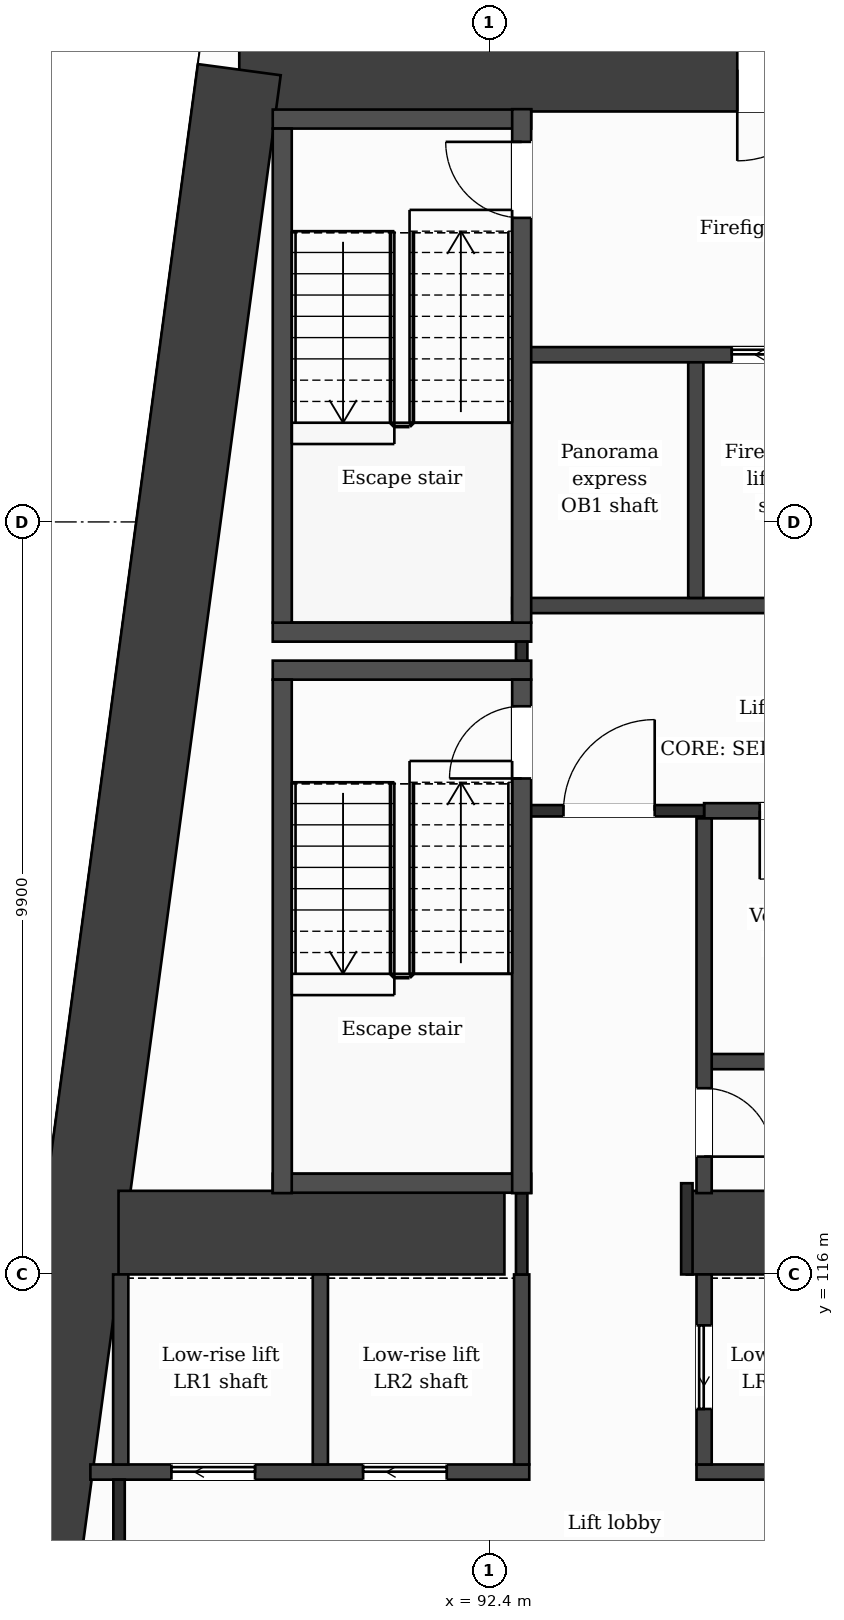
"""IFC4 building model, lengths in metres.
Left out: names, types, materials, properties, quantities, classifications, styles, units other than length and angle.
Written with IfcOpenShell. Run it as: python <this file> out.ifc"""

import sys

from ifc_helpers import new_model, si_unit, direction, frame, frame_2d, origin, place, context, subcontext, project, spatial, rectangle, extrude, element, fill, save


model = new_model("IFC4")
c1 = context("Model", 3, precision=1e-05, world=origin(), true_north=direction((0.0, 1.0)))
c2 = subcontext(c1, "Body", "Model", "MODEL_VIEW")
j1 = project(units=[si_unit("LENGTHUNIT", "METRE"), si_unit("PLANEANGLEUNIT", "RADIAN")], contexts=[c1])
p1 = place(None, origin())
s1 = spatial("IfcSite", under=j1, at=p1, CompositionType="ELEMENT")
p2 = place(p1, origin())
s2 = spatial("IfcBuilding", under=s1, at=p2, CompositionType="ELEMENT")
p3 = place(p2, frame((0.0, 0.0, 56.5)))
s3 = spatial("IfcBuildingStorey", under=s2, at=p3, CompositionType="ELEMENT", Elevation=56.5)
p4 = place(p3, frame((89.112, 131.85, 0.0), z_axis=(0.0, 0.0, 1.0), x_axis=(1.0, 0.0, 0.0)))
e1 = element("IfcWall", 1, at=p4, inside=s3, PredefinedType="SHEAR", context=c2, shape_type="SweptSolid", body=[
    extrude(rectangle(XDim=11.138, YDim=1.1, at=frame_2d((5.569, 0.0))), origin(), (0.0, 0.0, 1.0), 3.5),
])
p5 = place(p4, frame((6.552, 0.0, 0.0)))
e2 = element("IfcOpeningElement", 2, at=p5, cuts=e1, PredefinedType="OPENING", context=c2, shape_type="SweptSolid", body=[
    extrude(rectangle(XDim=1.2, YDim=2.1, at=frame_2d((0.6, 1.05))), frame((0.0, 0.56, 0.0), z_axis=(0.0, -1.0, 0.0), x_axis=(1.0, 0.0, 0.0)), (0.0, 0.0, 1.0), 1.12),
])
p6 = place(p3, frame((86.298, 110.95, 0.0), z_axis=(0.0, 0.0, 1.0), x_axis=(0.133400422634, 0.99106222168, 0.0)))
e3 = element("IfcWall", 3, at=p6, inside=s3, PredefinedType="SHEAR", context=c2, shape_type="SweptSolid", body=[
    extrude(rectangle(XDim=21.089, YDim=1.1, at=frame_2d((10.544, 0.0))), origin(), (0.0, 0.0, 1.0), 3.5),
])
p7 = place(p3, frame((87.523, 116.55, 0.0), z_axis=(0.0, 0.0, 1.0), x_axis=(1.0, 0.0, 0.0)))
e4 = element("IfcWall", 4, at=p7, inside=s3, PredefinedType="SHEAR", context=c2, shape_type="SweptSolid", body=[
    extrude(rectangle(XDim=5.077, YDim=1.1, at=frame_2d((2.539, 0.0))), origin(), (0.0, 0.0, 1.0), 3.5),
])
p8 = place(p3, frame((95.0, 116.55, 0.0), z_axis=(0.0, 0.0, 1.0), x_axis=(1.0, 0.0, 0.0)))
e5 = element("IfcWall", 5, at=p8, inside=s3, PredefinedType="SHEAR", context=c2, shape_type="SweptSolid", body=[
    extrude(rectangle(XDim=4.7, YDim=1.1, at=frame_2d((2.35, 0.0))), origin(), (0.0, 0.0, 1.0), 3.5),
])
p9 = place(p3, frame((87.153, 113.4, 0.0), z_axis=(0.0, 0.0, 1.0), x_axis=(1.0, 0.0, 0.0)))
e6 = element("IfcWall", 6, at=p9, inside=s3, PredefinedType="PARTITIONING", context=c2, shape_type="SweptSolid", body=[
    extrude(rectangle(XDim=5.774, YDim=0.2, at=frame_2d((2.887, 0.0))), origin(), (0.0, 0.0, 1.0), 3.18),
])
p10 = place(p9, frame((1.066, 0.0, 0.0)))
e7 = element("IfcOpeningElement", 7, at=p10, cuts=e6, PredefinedType="OPENING", context=c2, shape_type="SweptSolid", body=[
    extrude(rectangle(XDim=1.1, YDim=2.1, at=frame_2d((0.55, 1.05))), frame((0.0, 0.11, 0.0), z_axis=(0.0, -1.0, 0.0), x_axis=(1.0, 0.0, 0.0)), (0.0, 0.0, 1.0), 0.22),
])
p11 = place(p9, frame((3.588, 0.0, 0.0)))
e8 = element("IfcOpeningElement", 8, at=p11, cuts=e6, PredefinedType="OPENING", context=c2, shape_type="SweptSolid", body=[
    extrude(rectangle(XDim=1.1, YDim=2.1, at=frame_2d((0.55, 1.05))), frame((0.0, 0.11, 0.0), z_axis=(0.0, -1.0, 0.0), x_axis=(1.0, 0.0, 0.0)), (0.0, 0.0, 1.0), 0.22),
])
p12 = place(p3, frame((95.127, 113.4, 0.0), z_axis=(0.0, 0.0, 1.0), x_axis=(1.0, 0.0, 0.0)))
e9 = element("IfcWall", 9, at=p12, inside=s3, PredefinedType="PARTITIONING", context=c2, shape_type="SweptSolid", body=[
    extrude(rectangle(XDim=4.573, YDim=0.2, at=frame_2d((2.287, 0.0))), origin(), (0.0, 0.0, 1.0), 3.18),
])
p13 = place(p12, frame((3.164, 0.0, 0.0)))
e10 = element("IfcOpeningElement", 10, at=p13, cuts=e9, PredefinedType="OPENING", context=c2, shape_type="SweptSolid", body=[
    extrude(rectangle(XDim=0.9, YDim=2.1, at=frame_2d((0.45, 1.05))), frame((0.0, 0.11, 0.0), z_axis=(0.0, -1.0, 0.0), x_axis=(1.0, 0.0, 0.0)), (0.0, 0.0, 1.0), 0.22),
])
p14 = place(p3, frame((89.552, 117.2, 0.0), z_axis=(0.0, 0.0, 1.0), x_axis=(1.0, 0.0, 0.0)))
e11 = element("IfcWall", 11, at=p14, inside=s3, PredefinedType="PARTITIONING", context=c2, shape_type="SweptSolid", body=[
    extrude(rectangle(XDim=3.4, YDim=0.25, at=frame_2d((1.7, 0.0))), origin(), (0.0, 0.0, 1.0), 3.18),
])
p15 = place(p3, frame((95.227, 118.8, 0.0), z_axis=(0.0, 0.0, 1.0), x_axis=(1.0, 0.0, 0.0)))
e12 = element("IfcWall", 12, at=p15, inside=s3, PredefinedType="PARTITIONING", context=c2, shape_type="SweptSolid", body=[
    extrude(rectangle(XDim=4.473, YDim=0.2, at=frame_2d((2.236, 0.0))), origin(), (0.0, 0.0, 1.0), 3.18),
])
p16 = place(p3, frame((95.227, 122.1, 0.0), z_axis=(0.0, 0.0, 1.0), x_axis=(1.0, 0.0, 0.0)))
e13 = element("IfcWall", 13, at=p16, inside=s3, PredefinedType="PARTITIONING", context=c2, shape_type="SweptSolid", body=[
    extrude(rectangle(XDim=4.473, YDim=0.2, at=frame_2d((2.236, 0.0))), origin(), (0.0, 0.0, 1.0), 3.18),
])
p17 = place(p16, frame((0.732, 0.0, 0.0)))
e14 = element("IfcOpeningElement", 14, at=p17, cuts=e13, PredefinedType="OPENING", context=c2, shape_type="SweptSolid", body=[
    extrude(rectangle(XDim=0.9, YDim=2.1, at=frame_2d((0.45, 1.05))), frame((0.0, 0.11, 0.0), z_axis=(0.0, -1.0, 0.0), x_axis=(1.0, 0.0, 0.0)), (0.0, 0.0, 1.0), 0.22),
])
p18 = place(p16, frame((3.064, 0.0, 0.0)))
e15 = element("IfcOpeningElement", 15, at=p18, cuts=e13, PredefinedType="OPENING", context=c2, shape_type="SweptSolid", body=[
    extrude(rectangle(XDim=0.9, YDim=2.1, at=frame_2d((0.45, 1.05))), frame((0.0, 0.11, 0.0), z_axis=(0.0, -1.0, 0.0), x_axis=(1.0, 0.0, 0.0)), (0.0, 0.0, 1.0), 0.22),
])
p19 = place(p3, frame((92.827, 122.1, 0.0), z_axis=(0.0, 0.0, 1.0), x_axis=(1.0, 0.0, 0.0)))
e16 = element("IfcWall", 16, at=p19, inside=s3, PredefinedType="PARTITIONING", context=c2, shape_type="SweptSolid", body=[
    extrude(rectangle(XDim=2.4, YDim=0.15, at=frame_2d((1.2, 0.0))), origin(), (0.0, 0.0, 1.0), 3.18),
])
p20 = place(p19, frame((0.55, 0.0, 0.0)))
e17 = element("IfcOpeningElement", 17, at=p20, cuts=e16, PredefinedType="OPENING", context=c2, shape_type="SweptSolid", body=[
    extrude(rectangle(XDim=1.2, YDim=2.1, at=frame_2d((0.6, 1.05))), frame((0.0, 0.085, 0.0), z_axis=(0.0, -1.0, 0.0), x_axis=(1.0, 0.0, 0.0)), (0.0, 0.0, 1.0), 0.17),
])
for number, where, z_axis, x_axis in (
    (18, (89.552, 123.95, 0.0), (0.0, 0.0, 1.0), (1.0, 0.0, 0.0)),
    (19, (89.552, 124.45, 0.0), (0.0, 0.0, 1.0), (1.0, 0.0, 0.0)),
):
    element("IfcWall", number, at=place(p3, frame(where, z_axis=z_axis, x_axis=x_axis)), inside=s3, PredefinedType="PARTITIONING", context=c2, shape_type="SweptSolid", body=[
        extrude(rectangle(XDim=3.4, YDim=0.25, at=frame_2d((1.7, 0.0))), origin(), (0.0, 0.0, 1.0), 3.18),
    ])
p21 = place(p3, frame((92.702, 124.8, 0.0), z_axis=(0.0, 0.0, 1.0), x_axis=(1.0, 0.0, 0.0)))
e20 = element("IfcWall", 20, at=p21, inside=s3, PredefinedType="PARTITIONING", context=c2, shape_type="SweptSolid", body=[
    extrude(rectangle(XDim=6.998, YDim=0.2, at=frame_2d((3.499, 0.0))), origin(), (0.0, 0.0, 1.0), 3.18),
])
p22 = place(p21, frame((5.253, 0.0, 0.0)))
e21 = element("IfcOpeningElement", 21, at=p22, cuts=e20, PredefinedType="OPENING", context=c2, shape_type="SweptSolid", body=[
    extrude(rectangle(XDim=1.1, YDim=2.1, at=frame_2d((0.55, 1.05))), frame((0.0, 0.11, 0.0), z_axis=(0.0, -1.0, 0.0), x_axis=(1.0, 0.0, 0.0)), (0.0, 0.0, 1.0), 0.22),
])
p23 = place(p3, frame((92.827, 128.1, 0.0), z_axis=(0.0, 0.0, 1.0), x_axis=(1.0, 0.0, 0.0)))
e22 = element("IfcWall", 22, at=p23, inside=s3, PredefinedType="PARTITIONING", context=c2, shape_type="SweptSolid", body=[
    extrude(rectangle(XDim=6.873, YDim=0.2, at=frame_2d((3.437, 0.0))), origin(), (0.0, 0.0, 1.0), 3.18),
])
p24 = place(p23, frame((2.764, 0.0, 0.0)))
e23 = element("IfcOpeningElement", 23, at=p24, cuts=e22, PredefinedType="OPENING", context=c2, shape_type="SweptSolid", body=[
    extrude(rectangle(XDim=1.1, YDim=2.1, at=frame_2d((0.55, 1.05))), frame((0.0, 0.11, 0.0), z_axis=(0.0, -1.0, 0.0), x_axis=(1.0, 0.0, 0.0)), (0.0, 0.0, 1.0), 0.22),
])
p25 = place(p3, frame((89.552, 131.2, 0.0), z_axis=(0.0, 0.0, 1.0), x_axis=(1.0, 0.0, 0.0)))
e24 = element("IfcWall", 24, at=p25, inside=s3, PredefinedType="PARTITIONING", context=c2, shape_type="SweptSolid", body=[
    extrude(rectangle(XDim=3.4, YDim=0.25, at=frame_2d((1.7, 0.0))), origin(), (0.0, 0.0, 1.0), 3.18),
])
p26 = place(p3, frame((87.552, 113.5, 0.0), z_axis=(0.0, 0.0, 1.0), x_axis=(0.0, 1.0, 0.0)))
e25 = element("IfcWall", 25, at=p26, inside=s3, PredefinedType="PARTITIONING", context=c2, shape_type="SweptSolid", body=[
    extrude(rectangle(XDim=2.5, YDim=0.2, at=frame_2d((1.25, 0.0))), origin(), (0.0, 0.0, 1.0), 3.18),
])
p27 = place(p3, frame((87.53, 111.5, 0.0), z_axis=(0.0, 0.0, 1.0), x_axis=(0.0, 1.0, 0.0)))
e26 = element("IfcWall", 26, at=p27, inside=s3, PredefinedType="PARTITIONING", context=c2, shape_type="SweptSolid", body=[
    extrude(rectangle(XDim=1.8, YDim=0.15, at=frame_2d((0.9, 0.0))), origin(), (0.0, 0.0, 1.0), 3.18),
])
p28 = place(p3, frame((89.677, 117.07, 0.0), z_axis=(0.0, 0.0, 1.0), x_axis=(0.0, 1.0, 0.0)))
e27 = element("IfcWall", 27, at=p28, inside=s3, PredefinedType="PARTITIONING", context=c2, shape_type="SweptSolid", body=[
    extrude(rectangle(XDim=6.755, YDim=0.25, at=frame_2d((3.377, 0.0))), origin(), (0.0, 0.0, 1.0), 3.18),
])
p29 = place(p3, frame((89.677, 124.575, 0.0), z_axis=(0.0, 0.0, 1.0), x_axis=(0.0, 1.0, 0.0)))
e28 = element("IfcWall", 28, at=p29, inside=s3, PredefinedType="PARTITIONING", context=c2, shape_type="SweptSolid", body=[
    extrude(rectangle(XDim=6.5, YDim=0.25, at=frame_2d((3.25, 0.0))), origin(), (0.0, 0.0, 1.0), 3.18),
])
for number, where, z_axis, x_axis in (
    (29, (90.178, 113.5, 0.0), (0.0, 0.0, 1.0), (0.0, 1.0, 0.0)),
    (30, (92.827, 113.5, 0.0), (0.0, 0.0, 1.0), (0.0, 1.0, 0.0)),
):
    element("IfcWall", number, at=place(p3, frame(where, z_axis=z_axis, x_axis=x_axis)), inside=s3, PredefinedType="PARTITIONING", context=c2, shape_type="SweptSolid", body=[
        extrude(rectangle(XDim=2.5, YDim=0.2, at=frame_2d((1.25, 0.0))), origin(), (0.0, 0.0, 1.0), 3.18),
    ])
p30 = place(p3, frame((92.827, 116.0, 0.0), z_axis=(0.0, 0.0, 1.0), x_axis=(0.0, 1.0, 0.0)))
e31 = element("IfcWall", 31, at=p30, inside=s3, PredefinedType="PARTITIONING", context=c2, shape_type="SweptSolid", body=[
    extrude(rectangle(XDim=1.07, YDim=0.15, at=frame_2d((0.535, 0.0))), origin(), (0.0, 0.0, 1.0), 3.18),
])
p31 = place(p3, frame((92.827, 124.075, 0.0), z_axis=(0.0, 0.0, 1.0), x_axis=(0.0, 1.0, 0.0)))
e32 = element("IfcWall", 32, at=p31, inside=s3, PredefinedType="PARTITIONING", context=c2, shape_type="SweptSolid", body=[
    extrude(rectangle(XDim=0.25, YDim=0.15, at=frame_2d((0.125, 0.0))), origin(), (0.0, 0.0, 1.0), 3.18),
])
p32 = place(p3, frame((92.827, 117.07, 0.0), z_axis=(0.0, 0.0, 1.0), x_axis=(0.0, 1.0, 0.0)))
e33 = element("IfcWall", 33, at=p32, inside=s3, PredefinedType="PARTITIONING", context=c2, shape_type="SweptSolid", body=[
    extrude(rectangle(XDim=6.755, YDim=0.25, at=frame_2d((3.377, 0.0))), origin(), (0.0, 0.0, 1.0), 3.18),
])
p33 = place(p32, frame((5.455, 0.0, 0.0)))
e34 = element("IfcOpeningElement", 34, at=p33, cuts=e33, PredefinedType="OPENING", context=c2, shape_type="SweptSolid", body=[
    extrude(rectangle(XDim=0.95, YDim=2.1, at=frame_2d((0.475, 1.05))), frame((0.0, 0.135, 0.0), z_axis=(0.0, -1.0, 0.0), x_axis=(1.0, 0.0, 0.0)), (0.0, 0.0, 1.0), 0.27),
])
p34 = place(p3, frame((92.827, 124.575, 0.0), z_axis=(0.0, 0.0, 1.0), x_axis=(0.0, 1.0, 0.0)))
e35 = element("IfcWall", 35, at=p34, inside=s3, PredefinedType="PARTITIONING", context=c2, shape_type="SweptSolid", body=[
    extrude(rectangle(XDim=6.755, YDim=0.25, at=frame_2d((3.377, 0.0))), origin(), (0.0, 0.0, 1.0), 3.18),
])
p35 = place(p34, frame((5.325, 0.0, 0.0)))
e36 = element("IfcOpeningElement", 36, at=p35, cuts=e35, PredefinedType="OPENING", context=c2, shape_type="SweptSolid", body=[
    extrude(rectangle(XDim=1.0, YDim=2.1, at=frame_2d((0.5, 1.05))), frame((0.0, 0.135, 0.0), z_axis=(0.0, -1.0, 0.0), x_axis=(1.0, 0.0, 0.0)), (0.0, 0.0, 1.0), 0.27),
])
p36 = place(p3, frame((95.0, 116.0, 0.0), z_axis=(0.0, 0.0, 1.0), x_axis=(0.0, 1.0, 0.0)))
e37 = element("IfcWall", 37, at=p36, inside=s3, PredefinedType="PARTITIONING", context=c2, shape_type="SweptSolid", body=[
    extrude(rectangle(XDim=1.2, YDim=0.15, at=frame_2d((0.6, 0.0))), origin(), (0.0, 0.0, 1.0), 3.18),
])
p37 = place(p3, frame((95.118, 124.9, 0.0), z_axis=(0.0, 0.0, 1.0), x_axis=(0.0, 1.0, 0.0)))
e38 = element("IfcWall", 38, at=p37, inside=s3, PredefinedType="PARTITIONING", context=c2, shape_type="SweptSolid", body=[
    extrude(rectangle(XDim=3.1, YDim=0.2, at=frame_2d((1.55, 0.0))), origin(), (0.0, 0.0, 1.0), 3.18),
])
p38 = place(p3, frame((95.227, 113.5, 0.0), z_axis=(0.0, 0.0, 1.0), x_axis=(0.0, 1.0, 0.0)))
e39 = element("IfcWall", 39, at=p38, inside=s3, PredefinedType="PARTITIONING", context=c2, shape_type="SweptSolid", body=[
    extrude(rectangle(XDim=2.5, YDim=0.2, at=frame_2d((1.25, 0.0))), origin(), (0.0, 0.0, 1.0), 3.18),
])
p39 = place(p38, frame((0.73, 0.0, 0.0)))
e40 = element("IfcOpeningElement", 40, at=p39, cuts=e39, PredefinedType="OPENING", context=c2, shape_type="SweptSolid", body=[
    extrude(rectangle(XDim=1.1, YDim=2.1, at=frame_2d((0.55, 1.05))), frame((0.0, 0.11, 0.0), z_axis=(0.0, -1.0, 0.0), x_axis=(1.0, 0.0, 0.0)), (0.0, 0.0, 1.0), 0.22),
])
p40 = place(p3, frame((95.227, 117.07, 0.0), z_axis=(0.0, 0.0, 1.0), x_axis=(0.0, 1.0, 0.0)))
e41 = element("IfcWall", 41, at=p40, inside=s3, PredefinedType="PARTITIONING", context=c2, shape_type="SweptSolid", body=[
    extrude(rectangle(XDim=4.93, YDim=0.2, at=frame_2d((2.465, 0.0))), origin(), (0.0, 0.0, 1.0), 3.18),
])
p41 = place(p40, frame((0.48, 0.0, 0.0)))
e42 = element("IfcOpeningElement", 42, at=p41, cuts=e41, PredefinedType="OPENING", context=c2, shape_type="SweptSolid", body=[
    extrude(rectangle(XDim=0.9, YDim=2.1, at=frame_2d((0.45, 1.05))), frame((0.0, 0.11, 0.0), z_axis=(0.0, -1.0, 0.0), x_axis=(1.0, 0.0, 0.0)), (0.0, 0.0, 1.0), 0.22),
])
p42 = place(p20, origin())
e43 = element("IfcDoor", 43, at=p42, inside=s3, OperationType="SINGLE_SWING_RIGHT", PredefinedType="DOOR", context=c2, shape_type="SweptSolid", body=[
    extrude(rectangle(XDim=1.2, YDim=2.1, at=frame_2d((0.6, 1.05))), frame((0.0, 0.025, 0.0), z_axis=(0.0, -1.0, 0.0), x_axis=(1.0, 0.0, 0.0)), (0.0, 0.0, 1.0), 0.05),
])
fill(e17, e43)
p43 = place(p24, origin())
e44 = element("IfcDoor", 44, at=p43, inside=s3, OperationType="SLIDING_TO_LEFT", PredefinedType="DOOR", context=c2, shape_type="SweptSolid", body=[
    extrude(rectangle(XDim=1.1, YDim=2.1, at=frame_2d((0.55, 1.05))), frame((0.0, 0.025, 0.0), z_axis=(0.0, -1.0, 0.0), x_axis=(1.0, 0.0, 0.0)), (0.0, 0.0, 1.0), 0.05),
])
fill(e23, e44)
p44 = place(p17, origin())
e45 = element("IfcDoor", 45, at=p44, inside=s3, OperationType="SINGLE_SWING_LEFT", PredefinedType="DOOR", context=c2, shape_type="SweptSolid", body=[
    extrude(rectangle(XDim=0.9, YDim=2.1, at=frame_2d((0.45, 1.05))), frame((0.0, 0.025, 0.0), z_axis=(0.0, -1.0, 0.0), x_axis=(1.0, 0.0, 0.0)), (0.0, 0.0, 1.0), 0.05),
])
fill(e14, e45)
p45 = place(p33, origin())
e46 = element("IfcDoor", 46, at=p45, inside=s3, OperationType="SINGLE_SWING_LEFT", PredefinedType="DOOR", context=c2, shape_type="SweptSolid", body=[
    extrude(rectangle(XDim=0.95, YDim=2.1, at=frame_2d((0.475, 1.05))), frame((0.0, 0.025, 0.0), z_axis=(0.0, -1.0, 0.0), x_axis=(1.0, 0.0, 0.0)), (0.0, 0.0, 1.0), 0.05),
])
fill(e34, e46)
p46 = place(p35, origin())
e47 = element("IfcDoor", 47, at=p46, inside=s3, OperationType="SINGLE_SWING_RIGHT", PredefinedType="DOOR", context=c2, shape_type="SweptSolid", body=[
    extrude(rectangle(XDim=1.0, YDim=2.1, at=frame_2d((0.5, 1.05))), frame((0.0, 0.025, 0.0), z_axis=(0.0, -1.0, 0.0), x_axis=(1.0, 0.0, 0.0)), (0.0, 0.0, 1.0), 0.05),
])
fill(e36, e47)
p47 = place(p41, origin())
e48 = element("IfcDoor", 48, at=p47, inside=s3, OperationType="SINGLE_SWING_LEFT", PredefinedType="DOOR", context=c2, shape_type="SweptSolid", body=[
    extrude(rectangle(XDim=0.9, YDim=2.1, at=frame_2d((0.45, 1.05))), frame((0.0, 0.025, 0.0), z_axis=(0.0, -1.0, 0.0), x_axis=(1.0, 0.0, 0.0)), (0.0, 0.0, 1.0), 0.05),
])
fill(e42, e48)
p48 = place(p10, origin())
e49 = element("IfcDoor", 49, at=p48, inside=s3, OperationType="SLIDING_TO_LEFT", PredefinedType="DOOR", context=c2, shape_type="SweptSolid", body=[
    extrude(rectangle(XDim=1.1, YDim=2.1, at=frame_2d((0.55, 1.05))), frame((0.0, 0.025, 0.0), z_axis=(0.0, -1.0, 0.0), x_axis=(1.0, 0.0, 0.0)), (0.0, 0.0, 1.0), 0.05),
])
fill(e7, e49)
p49 = place(p11, origin())
e50 = element("IfcDoor", 50, at=p49, inside=s3, OperationType="SLIDING_TO_LEFT", PredefinedType="DOOR", context=c2, shape_type="SweptSolid", body=[
    extrude(rectangle(XDim=1.1, YDim=2.1, at=frame_2d((0.55, 1.05))), frame((0.0, 0.025, 0.0), z_axis=(0.0, -1.0, 0.0), x_axis=(1.0, 0.0, 0.0)), (0.0, 0.0, 1.0), 0.05),
])
fill(e8, e50)
p50 = place(p39, origin())
e51 = element("IfcDoor", 51, at=p50, inside=s3, OperationType="SLIDING_TO_LEFT", PredefinedType="DOOR", context=c2, shape_type="SweptSolid", body=[
    extrude(rectangle(XDim=1.1, YDim=2.1, at=frame_2d((0.55, 1.05))), frame((0.0, 0.025, 0.0), z_axis=(0.0, -1.0, 0.0), x_axis=(1.0, 0.0, 0.0)), (0.0, 0.0, 1.0), 0.05),
])
fill(e40, e51)
p51 = place(p5, origin())
e52 = element("IfcDoor", 52, at=p51, inside=s3, OperationType="SINGLE_SWING_LEFT", PredefinedType="DOOR", context=c2, shape_type="SweptSolid", body=[
    extrude(rectangle(XDim=1.2, YDim=2.1, at=frame_2d((0.6, 1.05))), frame((0.0, 0.025, 0.0), z_axis=(0.0, -1.0, 0.0), x_axis=(1.0, 0.0, 0.0)), (0.0, 0.0, 1.0), 0.05),
])
fill(e2, e52)
save(model, sys.argv[1])
